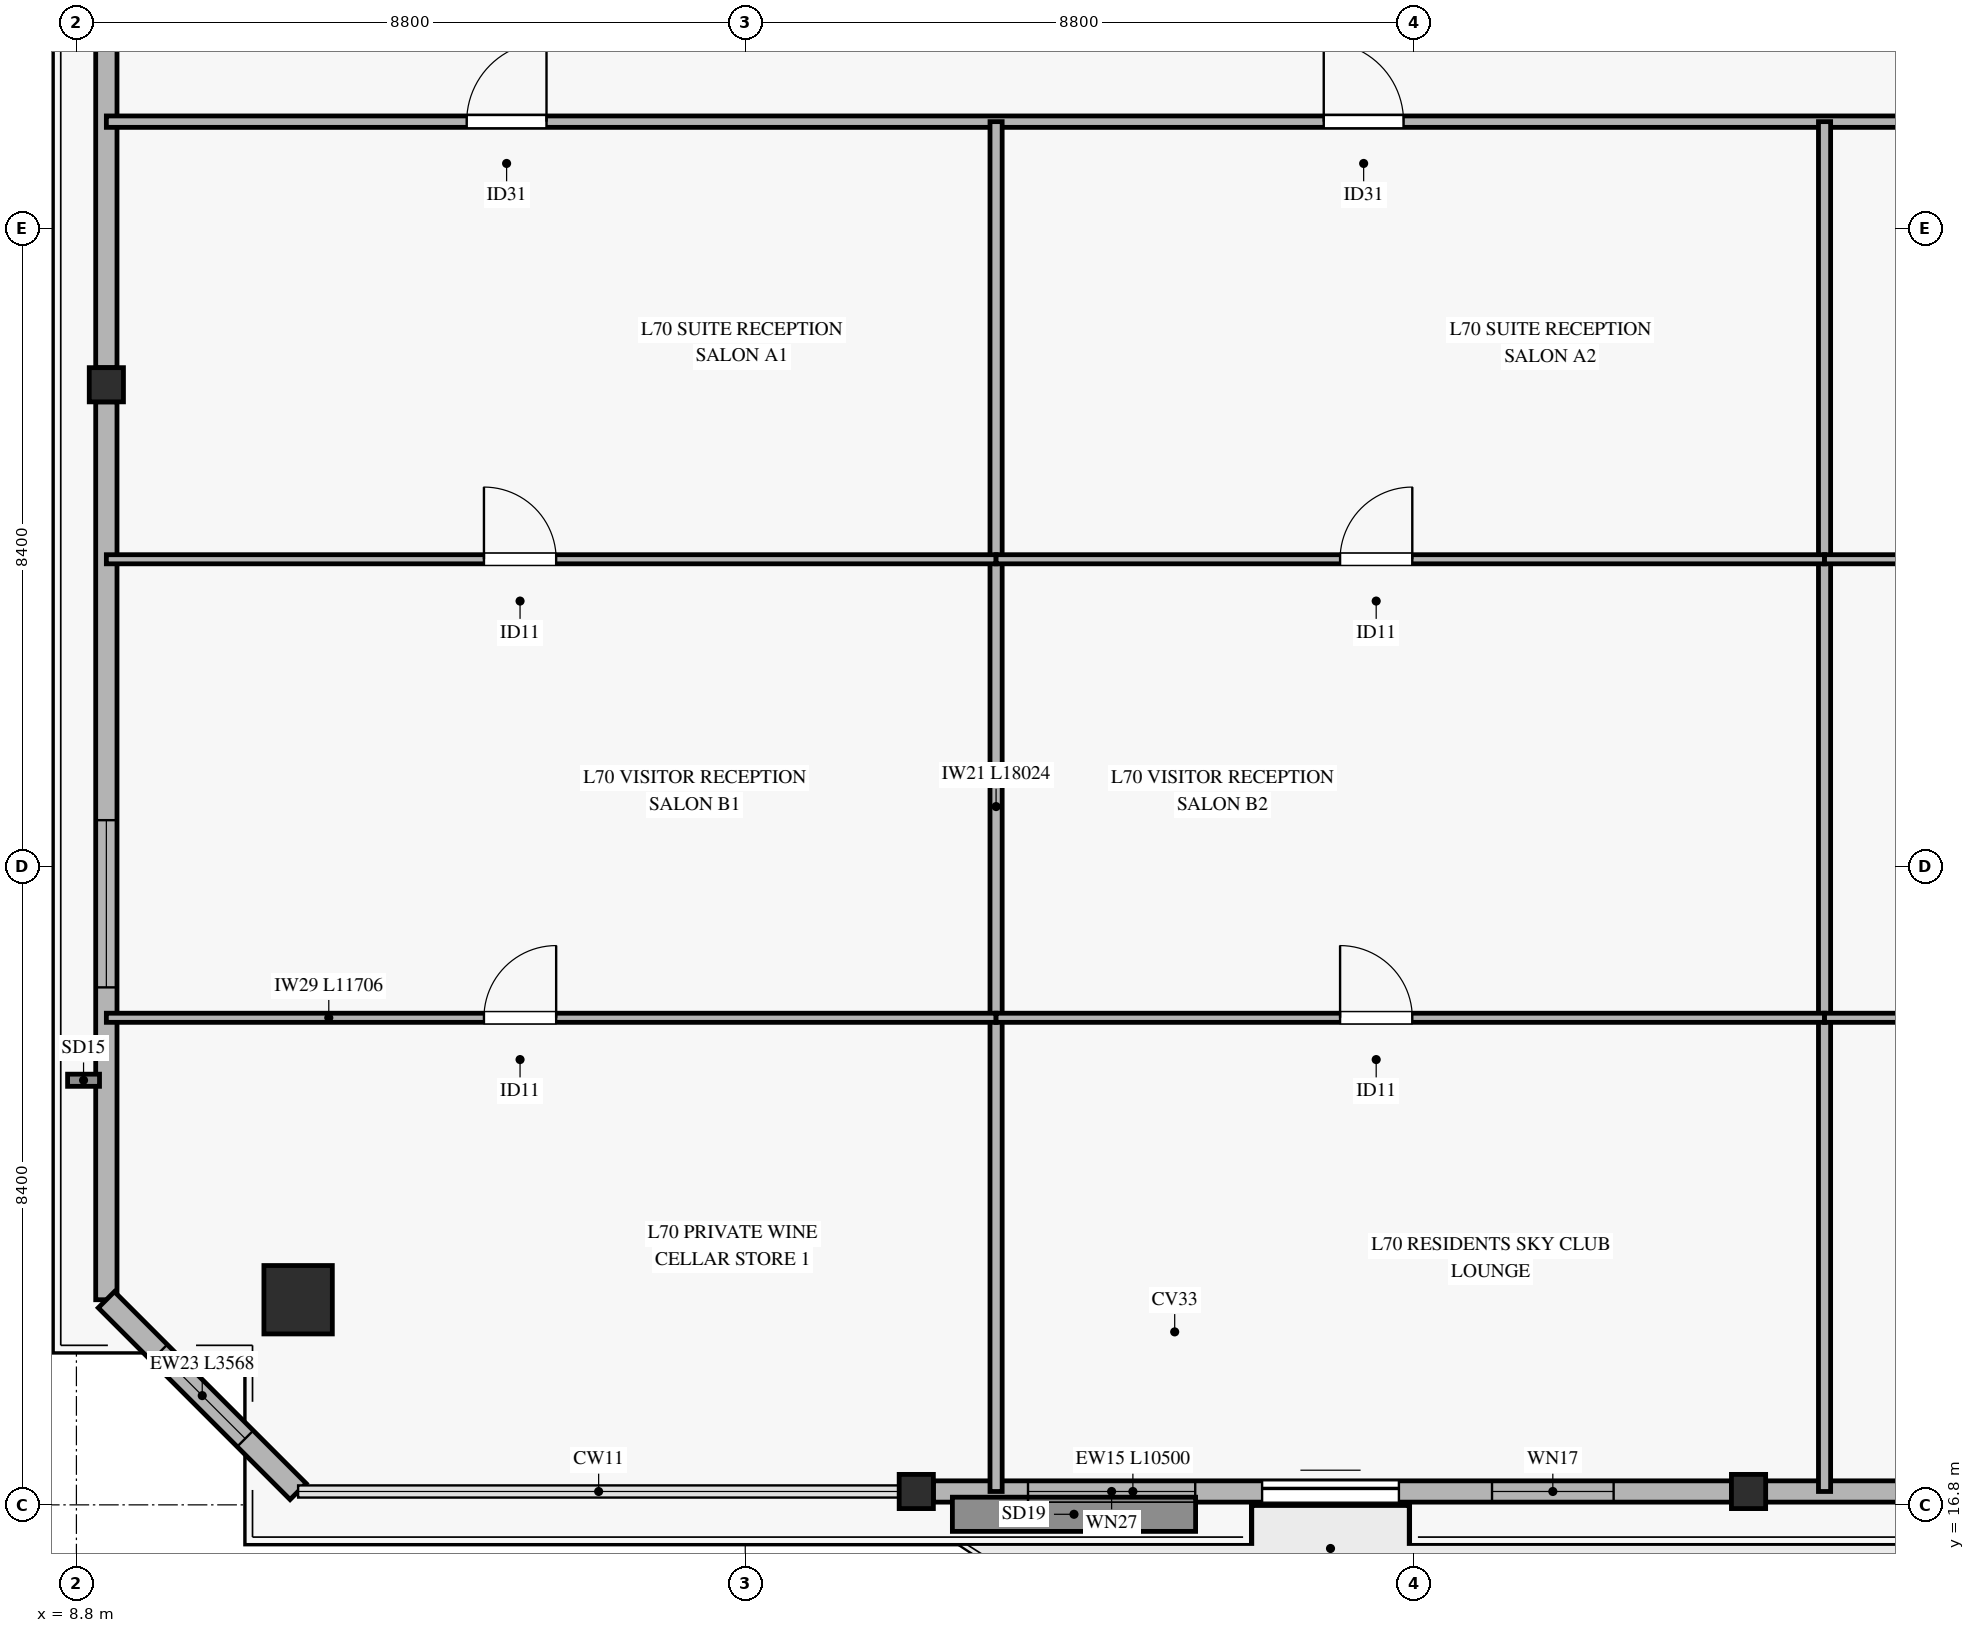
"""IFC4 building model, lengths in metres.
Left out: names, types, materials, properties, quantities, classifications, styles, units other than length and angle.
Written with IfcOpenShell. Run it as: python <this file> out.ifc"""

import sys

from ifc_helpers import new_model, si_unit, direction, frame, frame_2d, origin, origin_2d, place, context, subcontext, project, spatial, rectangle, hollow_rectangle, extrude, source, transform, mapped, element, fill, save


model = new_model("IFC4")
c1 = context("Model", 3, precision=1e-05, world=origin(), true_north=direction((0.0, 1.0)))
c2 = subcontext(c1, "Body", "Model", "MODEL_VIEW")
j1 = project(units=[si_unit("LENGTHUNIT", "METRE"), si_unit("PLANEANGLEUNIT", "RADIAN")], contexts=[c1])
p1 = place(None, origin())
s1 = spatial("IfcSite", under=j1, at=p1, CompositionType="ELEMENT")
p2 = place(p1, origin())
s2 = spatial("IfcBuilding", under=s1, at=p2, CompositionType="ELEMENT")
p3 = place(p2, frame((0.0, 0.0, 272.3)))
s3 = spatial("IfcBuildingStorey", under=s2, at=p3, CompositionType="ELEMENT", Elevation=272.3)
m1 = source(origin(), c2, "Body", "SweptSolid", [
    extrude(hollow_rectangle(XDim=0.9, YDim=0.9, WallThickness=0.04, at=origin_2d()), origin(), (0.0, 0.0, 1.0), 3.185),
])
p4 = place(p3, frame((11.717, 19.499, 0.0), z_axis=(0.0, 0.0, 1.0), x_axis=(1.0, 0.0, 0.0)))
e1 = element("IfcColumn", 1, at=p4, inside=s3, PredefinedType="COLUMN", context=c2, shape_type="MappedRepresentation", body=[
    mapped(m1, transform((0.0, 0.0, 0.0), x_axis=(1.0, 0.0, 0.0), y_axis=(0.0, 1.0, 0.0), z_axis=(0.0, 0.0, 1.0), scale=1.0)),
])
m2 = source(origin(), c2, "Body", "SweptSolid", [
    extrude(hollow_rectangle(XDim=0.45, YDim=0.45, WallThickness=0.022, at=origin_2d()), origin(), (0.0, 0.0, 1.0), 3.185),
])
for number, where, z_axis, x_axis in (
    (2, (19.85, 16.976, 0.0), (0.0, 0.0, 1.0), (1.0, 0.0, 0.0)),
    (3, (30.8, 16.976, 0.0), (0.0, 0.0, 1.0), (1.0, 0.0, 0.0)),
    (4, (9.194, 31.538, 0.0), (0.0, 0.0, 1.0), (1.0, 0.0, 0.0)),
):
    element("IfcColumn", number, at=place(p3, frame(where, z_axis=z_axis, x_axis=x_axis)), inside=s3, PredefinedType="COLUMN", context=c2, shape_type="MappedRepresentation", body=[
        mapped(m2, transform((0.0, 0.0, 0.0), x_axis=(1.0, 0.0, 0.0), y_axis=(0.0, 1.0, 0.0), z_axis=(0.0, 0.0, 1.0), scale=1.0)),
    ])
p5 = place(p3, frame((20.075, 16.976, 0.0), z_axis=(0.0, 0.0, 1.0), x_axis=(1.0, 0.0, 0.0)))
e5 = element("IfcWall", 5, at=p5, inside=s3, PredefinedType="SOLIDWALL", context=c2, shape_type="SweptSolid", body=[
    extrude(rectangle(XDim=10.5, YDim=0.28, at=frame_2d((5.25, 0.0))), origin(), (0.0, 0.0, 1.0), 2.815),
])
p6 = place(p5, frame((4.325, 0.0, 0.0)))
e6 = element("IfcOpeningElement", 6, at=p6, cuts=e5, PredefinedType="OPENING", context=c2, shape_type="SweptSolid", body=[
    extrude(rectangle(XDim=1.8, YDim=2.25, at=frame_2d((0.9, 1.125))), frame((0.0, 0.15, 0.0), z_axis=(0.0, -1.0, 0.0), x_axis=(1.0, 0.0, 0.0)), (0.0, 0.0, 1.0), 0.3),
])
p7 = place(p5, frame((1.245, 0.0, 0.45)))
e7 = element("IfcOpeningElement", 7, at=p7, cuts=e5, PredefinedType="OPENING", context=c2, shape_type="SweptSolid", body=[
    extrude(rectangle(XDim=2.2, YDim=2.1, at=frame_2d((1.1, 1.05))), frame((0.0, 0.15, 0.0), z_axis=(0.0, -1.0, 0.0), x_axis=(1.0, 0.0, 0.0)), (0.0, 0.0, 1.0), 0.3),
])
p8 = place(p5, frame((7.35, 0.0, 0.45)))
e8 = element("IfcOpeningElement", 8, at=p8, cuts=e5, PredefinedType="OPENING", context=c2, shape_type="SweptSolid", body=[
    extrude(rectangle(XDim=1.6, YDim=2.0, at=frame_2d((0.8, 1.0))), frame((0.0, 0.15, 0.0), z_axis=(0.0, -1.0, 0.0), x_axis=(1.0, 0.0, 0.0)), (0.0, 0.0, 1.0), 0.3),
])
p9 = place(p3, frame((31.025, 16.976, 0.0), z_axis=(0.0, 0.0, 1.0), x_axis=(1.0, 0.0, 0.0)))
e9 = element("IfcWall", 9, at=p9, inside=s3, PredefinedType="SOLIDWALL", context=c2, shape_type="SweptSolid", body=[
    extrude(rectangle(XDim=6.3, YDim=0.28, at=frame_2d((3.15, 0.0))), origin(), (0.0, 0.0, 1.0), 2.815),
])
p10 = place(p3, frame((9.194, 19.499, 0.0), z_axis=(0.0, 0.0, 1.0), x_axis=(0.0, 1.0, 0.0)))
e10 = element("IfcWall", 10, at=p10, inside=s3, PredefinedType="SOLIDWALL", context=c2, shape_type="SweptSolid", body=[
    extrude(rectangle(XDim=11.814, YDim=0.28, at=frame_2d((5.907, 0.0))), origin(), (0.0, 0.0, 1.0), 2.815),
])
p11 = place(p10, frame((4.11, 0.0, 0.45)))
e11 = element("IfcOpeningElement", 11, at=p11, cuts=e10, PredefinedType="OPENING", context=c2, shape_type="SweptSolid", body=[
    extrude(rectangle(XDim=2.2, YDim=2.1, at=frame_2d((1.1, 1.05))), frame((0.0, 0.15, 0.0), z_axis=(0.0, -1.0, 0.0), x_axis=(1.0, 0.0, 0.0)), (0.0, 0.0, 1.0), 0.3),
])
p12 = place(p3, frame((9.194, 31.763, 0.0), z_axis=(0.0, 0.0, 1.0), x_axis=(0.0, 1.0, 0.0)))
e12 = element("IfcWall", 12, at=p12, inside=s3, PredefinedType="SOLIDWALL", context=c2, shape_type="SweptSolid", body=[
    extrude(rectangle(XDim=11.814, YDim=0.28, at=frame_2d((5.907, 0.0))), origin(), (0.0, 0.0, 1.0), 2.815),
])
p13 = place(p12, frame((7.049, 0.0, 0.45)))
e13 = element("IfcOpeningElement", 13, at=p13, cuts=e12, PredefinedType="OPENING", context=c2, shape_type="SweptSolid", body=[
    extrude(rectangle(XDim=2.2, YDim=2.1, at=frame_2d((1.1, 1.05))), frame((0.0, 0.15, 0.0), z_axis=(0.0, -1.0, 0.0), x_axis=(1.0, 0.0, 0.0)), (0.0, 0.0, 1.0), 0.3),
])
p14 = place(p3, frame((9.194, 19.499, 0.0), z_axis=(0.0, 0.0, 1.0), x_axis=(0.707106781187, -0.707106781187, 0.0)))
e14 = element("IfcWall", 14, at=p14, inside=s3, PredefinedType="SOLIDWALL", context=c2, shape_type="SweptSolid", body=[
    extrude(rectangle(XDim=3.568, YDim=0.3, at=frame_2d((1.784, 0.0))), origin(), (0.0, 0.0, 1.0), 2.815),
])
p15 = place(p14, frame((0.984, 0.0, 0.45)))
e15 = element("IfcOpeningElement", 15, at=p15, cuts=e14, PredefinedType="OPENING", context=c2, shape_type="SweptSolid", body=[
    extrude(rectangle(XDim=1.6, YDim=2.0, at=frame_2d((0.8, 1.0))), frame((0.0, 0.16, 0.0), z_axis=(0.0, -1.0, 0.0), x_axis=(1.0, 0.0, 0.0)), (0.0, 0.0, 1.0), 0.32),
])
p16 = place(p3, frame((9.194, 35.0, 0.0), z_axis=(0.0, 0.0, 1.0), x_axis=(1.0, 0.0, 0.0)))
e16 = element("IfcWall", 16, at=p16, inside=s3, PredefinedType="PARTITIONING", context=c2, shape_type="SweptSolid", body=[
    extrude(rectangle(XDim=52.013, YDim=0.15, at=frame_2d((26.006, 0.0))), origin(), (0.0, 0.0, 1.0), 2.47),
])
p17 = place(p16, frame((4.741, 0.0, 0.0)))
e17 = element("IfcOpeningElement", 17, at=p17, cuts=e16, PredefinedType="OPENING", context=c2, shape_type="SweptSolid", body=[
    extrude(rectangle(XDim=1.05, YDim=2.15, at=frame_2d((0.525, 1.075))), frame((0.0, 0.085, 0.0), z_axis=(0.0, -1.0, 0.0), x_axis=(1.0, 0.0, 0.0)), (0.0, 0.0, 1.0), 0.17),
])
p18 = place(p16, frame((16.017, 0.0, 0.0)))
e18 = element("IfcOpeningElement", 18, at=p18, cuts=e16, PredefinedType="OPENING", context=c2, shape_type="SweptSolid", body=[
    extrude(rectangle(XDim=1.05, YDim=2.15, at=frame_2d((0.525, 1.075))), frame((0.0, 0.085, 0.0), z_axis=(0.0, -1.0, 0.0), x_axis=(1.0, 0.0, 0.0)), (0.0, 0.0, 1.0), 0.17),
])
p19 = place(p16, frame((26.879, 0.0, 0.0)))
e19 = element("IfcOpeningElement", 19, at=p19, cuts=e16, PredefinedType="OPENING", context=c2, shape_type="SweptSolid", body=[
    extrude(rectangle(XDim=1.05, YDim=2.15, at=frame_2d((0.525, 1.075))), frame((0.0, 0.085, 0.0), z_axis=(0.0, -1.0, 0.0), x_axis=(1.0, 0.0, 0.0)), (0.0, 0.0, 1.0), 0.17),
])
p20 = place(p16, frame((40.57, 0.0, 0.0)))
e20 = element("IfcOpeningElement", 20, at=p20, cuts=e16, PredefinedType="OPENING", context=c2, shape_type="SweptSolid", body=[
    extrude(rectangle(XDim=1.05, YDim=2.15, at=frame_2d((0.525, 1.075))), frame((0.0, 0.085, 0.0), z_axis=(0.0, -1.0, 0.0), x_axis=(1.0, 0.0, 0.0)), (0.0, 0.0, 1.0), 0.17),
])
for number, where, z_axis, x_axis in (
    (21, (20.9, 16.976, 0.0), (0.0, 0.0, 1.0), (0.0, 1.0, 0.0)),
    (22, (31.8, 16.976, 0.0), (0.0, 0.0, 1.0), (0.0, 1.0, 0.0)),
):
    element("IfcWall", number, at=place(p3, frame(where, z_axis=z_axis, x_axis=x_axis)), inside=s3, PredefinedType="PARTITIONING", context=c2, shape_type="SweptSolid", body=[
        extrude(rectangle(XDim=18.024, YDim=0.16, at=frame_2d((9.012, 0.0))), origin(), (0.0, 0.0, 1.0), 2.77),
    ])
p21 = place(p3, frame((9.194, 23.209, 0.0), z_axis=(0.0, 0.0, 1.0), x_axis=(1.0, 0.0, 0.0)))
e23 = element("IfcWall", 23, at=p21, inside=s3, PredefinedType="PARTITIONING", context=c2, shape_type="SweptSolid", body=[
    extrude(rectangle(XDim=11.706, YDim=0.12, at=frame_2d((5.853, 0.0))), origin(), (0.0, 0.0, 1.0), 2.47),
])
p22 = place(p21, frame((4.968, 0.0, 0.0)))
e24 = element("IfcOpeningElement", 24, at=p22, cuts=e23, PredefinedType="OPENING", context=c2, shape_type="SweptSolid", body=[
    extrude(rectangle(XDim=0.95, YDim=2.1, at=frame_2d((0.475, 1.05))), frame((0.0, 0.07, 0.0), z_axis=(0.0, -1.0, 0.0), x_axis=(1.0, 0.0, 0.0)), (0.0, 0.0, 1.0), 0.14),
])
p23 = place(p3, frame((9.194, 29.242, 0.0), z_axis=(0.0, 0.0, 1.0), x_axis=(1.0, 0.0, 0.0)))
e25 = element("IfcWall", 25, at=p23, inside=s3, PredefinedType="PARTITIONING", context=c2, shape_type="SweptSolid", body=[
    extrude(rectangle(XDim=11.706, YDim=0.12, at=frame_2d((5.853, 0.0))), origin(), (0.0, 0.0, 1.0), 2.47),
])
p24 = place(p23, frame((4.968, 0.0, 0.0)))
e26 = element("IfcOpeningElement", 26, at=p24, cuts=e25, PredefinedType="OPENING", context=c2, shape_type="SweptSolid", body=[
    extrude(rectangle(XDim=0.95, YDim=2.1, at=frame_2d((0.475, 1.05))), frame((0.0, 0.07, 0.0), z_axis=(0.0, -1.0, 0.0), x_axis=(1.0, 0.0, 0.0)), (0.0, 0.0, 1.0), 0.14),
])
p25 = place(p3, frame((20.9, 23.209, 0.0), z_axis=(0.0, 0.0, 1.0), x_axis=(1.0, 0.0, 0.0)))
e27 = element("IfcWall", 27, at=p25, inside=s3, PredefinedType="PARTITIONING", context=c2, shape_type="SweptSolid", body=[
    extrude(rectangle(XDim=10.9, YDim=0.12, at=frame_2d((5.45, 0.0))), origin(), (0.0, 0.0, 1.0), 2.47),
])
p26 = place(p25, frame((4.526, 0.0, 0.0)))
e28 = element("IfcOpeningElement", 28, at=p26, cuts=e27, PredefinedType="OPENING", context=c2, shape_type="SweptSolid", body=[
    extrude(rectangle(XDim=0.95, YDim=2.1, at=frame_2d((0.475, 1.05))), frame((0.0, 0.07, 0.0), z_axis=(0.0, -1.0, 0.0), x_axis=(1.0, 0.0, 0.0)), (0.0, 0.0, 1.0), 0.14),
])
p27 = place(p3, frame((20.9, 29.242, 0.0), z_axis=(0.0, 0.0, 1.0), x_axis=(1.0, 0.0, 0.0)))
e29 = element("IfcWall", 29, at=p27, inside=s3, PredefinedType="PARTITIONING", context=c2, shape_type="SweptSolid", body=[
    extrude(rectangle(XDim=10.9, YDim=0.12, at=frame_2d((5.45, 0.0))), origin(), (0.0, 0.0, 1.0), 2.47),
])
p28 = place(p27, frame((4.526, 0.0, 0.0)))
e30 = element("IfcOpeningElement", 30, at=p28, cuts=e29, PredefinedType="OPENING", context=c2, shape_type="SweptSolid", body=[
    extrude(rectangle(XDim=0.95, YDim=2.1, at=frame_2d((0.475, 1.05))), frame((0.0, 0.07, 0.0), z_axis=(0.0, -1.0, 0.0), x_axis=(1.0, 0.0, 0.0)), (0.0, 0.0, 1.0), 0.14),
])
p29 = place(p3, frame((31.8, 23.209, 0.0), z_axis=(0.0, 0.0, 1.0), x_axis=(1.0, 0.0, 0.0)))
e31 = element("IfcWall", 31, at=p29, inside=s3, PredefinedType="PARTITIONING", context=c2, shape_type="SweptSolid", body=[
    extrude(rectangle(XDim=10.8, YDim=0.12, at=frame_2d((5.4, 0.0))), origin(), (0.0, 0.0, 1.0), 2.47),
])
p30 = place(p29, frame((4.486, 0.0, 0.0)))
e32 = element("IfcOpeningElement", 32, at=p30, cuts=e31, PredefinedType="OPENING", context=c2, shape_type="SweptSolid", body=[
    extrude(rectangle(XDim=0.95, YDim=2.1, at=frame_2d((0.475, 1.05))), frame((0.0, 0.07, 0.0), z_axis=(0.0, -1.0, 0.0), x_axis=(1.0, 0.0, 0.0)), (0.0, 0.0, 1.0), 0.14),
])
p31 = place(p3, frame((31.8, 29.242, 0.0), z_axis=(0.0, 0.0, 1.0), x_axis=(1.0, 0.0, 0.0)))
e33 = element("IfcWall", 33, at=p31, inside=s3, PredefinedType="PARTITIONING", context=c2, shape_type="SweptSolid", body=[
    extrude(rectangle(XDim=10.8, YDim=0.12, at=frame_2d((5.4, 0.0))), origin(), (0.0, 0.0, 1.0), 2.47),
])
p32 = place(p31, frame((4.486, 0.0, 0.0)))
e34 = element("IfcOpeningElement", 34, at=p32, cuts=e33, PredefinedType="OPENING", context=c2, shape_type="SweptSolid", body=[
    extrude(rectangle(XDim=0.95, YDim=2.1, at=frame_2d((0.475, 1.05))), frame((0.0, 0.07, 0.0), z_axis=(0.0, -1.0, 0.0), x_axis=(1.0, 0.0, 0.0)), (0.0, 0.0, 1.0), 0.14),
])
m3 = source(origin(), c2, "Body", "SweptSolid", [
    extrude(rectangle(XDim=1.8, YDim=2.25, at=frame_2d((0.9, 1.125))), frame((0.0, 0.025, 0.0), z_axis=(0.0, -1.0, 0.0), x_axis=(1.0, 0.0, 0.0)), (0.0, 0.0, 1.0), 0.05),
])
p33 = place(p6, origin())
e35 = element("IfcDoor", 35, at=p33, inside=s3, OperationType="SLIDING_TO_LEFT", PredefinedType="DOOR", context=c2, shape_type="MappedRepresentation", body=[
    mapped(m3, transform((0.0, 0.0, 0.0), x_axis=(1.0, 0.0, 0.0), y_axis=(0.0, 1.0, 0.0), z_axis=(0.0, 0.0, 1.0), scale=1.0)),
])
fill(e6, e35)
m4 = source(origin(), c2, "Body", "SweptSolid", [
    extrude(rectangle(XDim=2.2, YDim=2.1, at=frame_2d((1.1, 1.05))), frame((0.0, 0.03, 0.0), z_axis=(0.0, -1.0, 0.0), x_axis=(1.0, 0.0, 0.0)), (0.0, 0.0, 1.0), 0.06),
])
p34 = place(p7, origin())
e36 = element("IfcWindow", 36, at=p34, inside=s3, PartitioningType="SINGLE_PANEL", PredefinedType="WINDOW", context=c2, shape_type="MappedRepresentation", body=[
    mapped(m4, transform((0.0, 0.0, 0.0), x_axis=(1.0, 0.0, 0.0), y_axis=(0.0, 1.0, 0.0), z_axis=(0.0, 0.0, 1.0), scale=1.0)),
])
fill(e7, e36)
m5 = source(origin(), c2, "Body", "SweptSolid", [
    extrude(rectangle(XDim=1.6, YDim=2.0, at=frame_2d((0.8, 1.0))), frame((0.0, 0.03, 0.0), z_axis=(0.0, -1.0, 0.0), x_axis=(1.0, 0.0, 0.0)), (0.0, 0.0, 1.0), 0.06),
])
p35 = place(p8, origin())
e37 = element("IfcWindow", 37, at=p35, inside=s3, PartitioningType="SINGLE_PANEL", PredefinedType="WINDOW", context=c2, shape_type="MappedRepresentation", body=[
    mapped(m5, transform((0.0, 0.0, 0.0), x_axis=(1.0, 0.0, 0.0), y_axis=(0.0, 1.0, 0.0), z_axis=(0.0, 0.0, 1.0), scale=1.0)),
])
fill(e8, e37)
p36 = place(p11, origin())
e38 = element("IfcWindow", 38, at=p36, inside=s3, PartitioningType="SINGLE_PANEL", PredefinedType="WINDOW", context=c2, shape_type="MappedRepresentation", body=[
    mapped(m4, transform((0.0, 0.0, 0.0), x_axis=(1.0, 0.0, 0.0), y_axis=(0.0, 1.0, 0.0), z_axis=(0.0, 0.0, 1.0), scale=1.0)),
])
fill(e11, e38)
p37 = place(p15, origin())
e39 = element("IfcWindow", 39, at=p37, inside=s3, PartitioningType="SINGLE_PANEL", PredefinedType="WINDOW", context=c2, shape_type="MappedRepresentation", body=[
    mapped(m5, transform((0.0, 0.0, 0.0), x_axis=(1.0, 0.0, 0.0), y_axis=(0.0, 1.0, 0.0), z_axis=(0.0, 0.0, 1.0), scale=1.0)),
])
fill(e15, e39)
m6 = source(origin(), c2, "Body", "SweptSolid", [
    extrude(rectangle(XDim=1.05, YDim=2.15, at=frame_2d((0.525, 1.075))), frame((0.0, 0.025, 0.0), z_axis=(0.0, -1.0, 0.0), x_axis=(1.0, 0.0, 0.0)), (0.0, 0.0, 1.0), 0.05),
])
p38 = place(p17, origin())
e40 = element("IfcDoor", 40, at=p38, inside=s3, OperationType="SINGLE_SWING_RIGHT", PredefinedType="DOOR", context=c2, shape_type="MappedRepresentation", body=[
    mapped(m6, transform((0.0, 0.0, 0.0), x_axis=(1.0, 0.0, 0.0), y_axis=(0.0, 1.0, 0.0), z_axis=(0.0, 0.0, 1.0), scale=1.0)),
])
fill(e17, e40)
m7 = source(origin(), c2, "Body", "SweptSolid", [
    extrude(rectangle(XDim=0.95, YDim=2.1, at=frame_2d((0.475, 1.05))), frame((0.0, 0.025, 0.0), z_axis=(0.0, -1.0, 0.0), x_axis=(1.0, 0.0, 0.0)), (0.0, 0.0, 1.0), 0.05),
])
p39 = place(p24, origin())
e41 = element("IfcDoor", 41, at=p39, inside=s3, OperationType="SINGLE_SWING_LEFT", PredefinedType="DOOR", context=c2, shape_type="MappedRepresentation", body=[
    mapped(m7, transform((0.0, 0.0, 0.0), x_axis=(1.0, 0.0, 0.0), y_axis=(0.0, 1.0, 0.0), z_axis=(0.0, 0.0, 1.0), scale=1.0)),
])
fill(e26, e41)
p40 = place(p22, origin())
e42 = element("IfcDoor", 42, at=p40, inside=s3, OperationType="SINGLE_SWING_RIGHT", PredefinedType="DOOR", context=c2, shape_type="MappedRepresentation", body=[
    mapped(m7, transform((0.0, 0.0, 0.0), x_axis=(1.0, 0.0, 0.0), y_axis=(0.0, 1.0, 0.0), z_axis=(0.0, 0.0, 1.0), scale=1.0)),
])
fill(e24, e42)
p41 = place(p18, origin())
e43 = element("IfcDoor", 43, at=p41, inside=s3, OperationType="SINGLE_SWING_LEFT", PredefinedType="DOOR", context=c2, shape_type="MappedRepresentation", body=[
    mapped(m6, transform((0.0, 0.0, 0.0), x_axis=(1.0, 0.0, 0.0), y_axis=(0.0, 1.0, 0.0), z_axis=(0.0, 0.0, 1.0), scale=1.0)),
])
fill(e18, e43)
p42 = place(p28, origin())
e44 = element("IfcDoor", 44, at=p42, inside=s3, OperationType="SINGLE_SWING_RIGHT", PredefinedType="DOOR", context=c2, shape_type="MappedRepresentation", body=[
    mapped(m7, transform((0.0, 0.0, 0.0), x_axis=(1.0, 0.0, 0.0), y_axis=(0.0, 1.0, 0.0), z_axis=(0.0, 0.0, 1.0), scale=1.0)),
])
fill(e30, e44)
p43 = place(p26, origin())
e45 = element("IfcDoor", 45, at=p43, inside=s3, OperationType="SINGLE_SWING_LEFT", PredefinedType="DOOR", context=c2, shape_type="MappedRepresentation", body=[
    mapped(m7, transform((0.0, 0.0, 0.0), x_axis=(1.0, 0.0, 0.0), y_axis=(0.0, 1.0, 0.0), z_axis=(0.0, 0.0, 1.0), scale=1.0)),
])
fill(e28, e45)
save(model, sys.argv[1])
